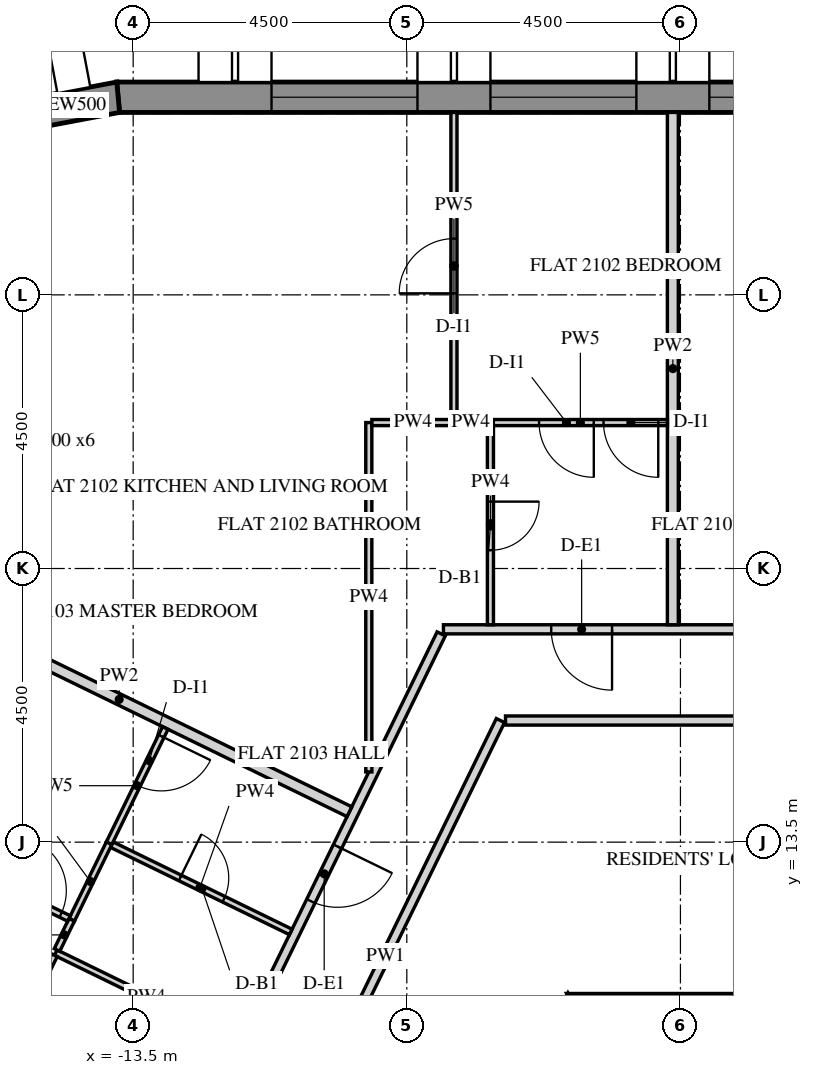
"""IFC4 building model, lengths in metres.
Left out: names, types, materials, properties, quantities, classifications, styles, units other than length and angle.
Written with IfcOpenShell. Run it as: python <this file> out.ifc"""

import sys

from ifc_helpers import new_model, si_unit, direction, frame, frame_2d, origin, place, context, subcontext, project, spatial, polyline, rectangle, outline, extrude, element, fill, save


model = new_model("IFC4")
c1 = context("Model", 3, precision=1e-05, world=origin(), true_north=direction((0.0, 1.0)))
c2 = subcontext(c1, "Body", "Model", "MODEL_VIEW")
j1 = project(units=[si_unit("LENGTHUNIT", "METRE"), si_unit("PLANEANGLEUNIT", "RADIAN")], contexts=[c1])
p1 = place(None, origin())
s1 = spatial("IfcSite", under=j1, at=p1, CompositionType="ELEMENT")
p2 = place(p1, origin())
s2 = spatial("IfcBuilding", under=s1, at=p2, CompositionType="ELEMENT")
p3 = place(p2, frame((0.0, 0.0, 267.9)))
s3 = spatial("IfcBuildingStorey", under=s2, at=p3, CompositionType="ELEMENT", Elevation=267.9)
p4 = place(p3, frame((11.698, 25.75, -0.15), z_axis=(0.0, 0.0, 1.0), x_axis=(-1.0, 0.0, 0.0)))
e1 = element("IfcWall", 1, at=p4, inside=s3, PredefinedType="SOLIDWALL", context=c2, shape_type="SweptSolid", body=[
    extrude(outline(polyline([(-0.021, -0.25), (25.468, -0.25), (25.421, 0.25), (0.021, 0.25), (-0.021, -0.25)])), origin(), (0.0, 0.0, 1.0), 3.9),
])
p5 = place(p4, frame((2.522, 0.0, 0.75)))
e2 = element("IfcOpeningElement", 2, at=p5, cuts=e1, PredefinedType="OPENING", context=c2, shape_type="SweptSolid", body=[
    extrude(rectangle(XDim=2.4, YDim=2.7, at=frame_2d((1.2, 1.35))), frame((0.0, 0.26, 0.0), z_axis=(0.0, -1.0, 0.0), x_axis=(1.0, 0.0, 0.0)), (0.0, 0.0, 1.0), 0.52),
])
p6 = place(p4, frame((6.122, 0.0, 0.75)))
e3 = element("IfcOpeningElement", 3, at=p6, cuts=e1, PredefinedType="OPENING", context=c2, shape_type="SweptSolid", body=[
    extrude(rectangle(XDim=2.4, YDim=2.7, at=frame_2d((1.2, 1.35))), frame((0.0, 0.26, 0.0), z_axis=(0.0, -1.0, 0.0), x_axis=(1.0, 0.0, 0.0)), (0.0, 0.0, 1.0), 0.52),
])
p7 = place(p4, frame((9.722, 0.0, 0.75)))
e4 = element("IfcOpeningElement", 4, at=p7, cuts=e1, PredefinedType="OPENING", context=c2, shape_type="SweptSolid", body=[
    extrude(rectangle(XDim=2.4, YDim=2.7, at=frame_2d((1.2, 1.35))), frame((0.0, 0.26, 0.0), z_axis=(0.0, -1.0, 0.0), x_axis=(1.0, 0.0, 0.0)), (0.0, 0.0, 1.0), 0.52),
])
p8 = place(p4, frame((13.323, 0.0, 0.75)))
e5 = element("IfcOpeningElement", 5, at=p8, cuts=e1, PredefinedType="OPENING", context=c2, shape_type="SweptSolid", body=[
    extrude(rectangle(XDim=2.4, YDim=2.7, at=frame_2d((1.2, 1.35))), frame((0.0, 0.26, 0.0), z_axis=(0.0, -1.0, 0.0), x_axis=(1.0, 0.0, 0.0)), (0.0, 0.0, 1.0), 0.52),
])
p9 = place(p4, frame((16.922, 0.0, 0.75)))
e6 = element("IfcOpeningElement", 6, at=p9, cuts=e1, PredefinedType="OPENING", context=c2, shape_type="SweptSolid", body=[
    extrude(rectangle(XDim=2.4, YDim=2.7, at=frame_2d((1.2, 1.35))), frame((0.0, 0.26, 0.0), z_axis=(0.0, -1.0, 0.0), x_axis=(1.0, 0.0, 0.0)), (0.0, 0.0, 1.0), 0.52),
])
p10 = place(p4, frame((20.522, 0.0, 0.75)))
e7 = element("IfcOpeningElement", 7, at=p10, cuts=e1, PredefinedType="OPENING", context=c2, shape_type="SweptSolid", body=[
    extrude(rectangle(XDim=2.4, YDim=2.7, at=frame_2d((1.2, 1.35))), frame((0.0, 0.26, 0.0), z_axis=(0.0, -1.0, 0.0), x_axis=(1.0, 0.0, 0.0)), (0.0, 0.0, 1.0), 0.52),
])
p11 = place(p3, frame((-13.747, 25.75, -0.15), z_axis=(0.0, 0.0, 1.0), x_axis=(-0.982736538448, -0.185010529429, 0.0)))
e8 = element("IfcWall", 8, at=p11, inside=s3, PredefinedType="SOLIDWALL", context=c2, shape_type="SweptSolid", body=[
    extrude(outline(polyline([(-0.023, -0.25), (1.435, -0.25), (1.341, 0.25), (0.023, 0.25), (-0.023, -0.25)])), origin(), (0.0, 0.0, 1.0), 3.9),
])
p12 = place(p3, frame((-6.235, 10.8, -0.15), z_axis=(0.0, 0.0, 1.0), x_axis=(-0.499996419489, -0.866027470984, 0.0)))
e9 = element("IfcWall", 9, at=p12, inside=s3, PredefinedType="SHEAR", context=c2, shape_type="SweptSolid", body=[
    extrude(outline(polyline([(-0.115, -0.2), (12.586, -0.2), (12.355, 0.2), (0.115, 0.2), (-0.115, -0.2)])), origin(), (0.0, 0.0, 1.0), 3.9),
])
p13 = place(p12, frame((5.364, 0.0, 0.15)))
e10 = element("IfcOpeningElement", 10, at=p13, cuts=e9, PredefinedType="OPENING", context=c2, shape_type="SweptSolid", body=[
    extrude(rectangle(XDim=1.8, YDim=2.4, at=frame_2d((0.9, 1.2))), frame((0.0, 0.21, 0.0), z_axis=(0.0, -1.0, 0.0), x_axis=(1.0, 0.0, 0.0)), (0.0, 0.0, 1.0), 0.42),
])
p14 = place(p3, frame((6.235, 10.8, -0.15), z_axis=(0.0, 0.0, 1.0), x_axis=(-1.0, 0.0, 0.0)))
e11 = element("IfcWall", 11, at=p14, inside=s3, PredefinedType="SHEAR", context=c2, shape_type="SweptSolid", body=[
    extrude(outline(polyline([(-0.115, -0.2), (12.586, -0.2), (12.355, 0.2), (0.115, 0.2), (-0.115, -0.2)])), origin(), (0.0, 0.0, 1.0), 3.9),
])
p15 = place(p3, frame((6.627, 17.0, 0.0), z_axis=(0.0, 0.0, 1.0), x_axis=(-1.0, 0.0, 0.0)))
e12 = element("IfcWall", 12, at=p15, inside=s3, PredefinedType="PARTITIONING", context=c2, shape_type="SweptSolid", body=[
    extrude(rectangle(XDim=15.024, YDim=0.15, at=frame_2d((7.512, 0.0))), origin(), (0.0, 0.0, 1.0), 2.988),
])
p16 = place(p15, frame((0.8, 0.0, 0.0)))
e13 = element("IfcOpeningElement", 13, at=p16, cuts=e12, PredefinedType="OPENING", context=c2, shape_type="SweptSolid", body=[
    extrude(rectangle(XDim=1.0, YDim=2.1, at=frame_2d((0.5, 1.05))), frame((0.0, 0.085, 0.0), z_axis=(0.0, -1.0, 0.0), x_axis=(1.0, 0.0, 0.0)), (0.0, 0.0, 1.0), 0.17),
])
p17 = place(p15, frame((12.251, 0.0, 0.0)))
e14 = element("IfcOpeningElement", 14, at=p17, cuts=e12, PredefinedType="OPENING", context=c2, shape_type="SweptSolid", body=[
    extrude(rectangle(XDim=1.0, YDim=2.1, at=frame_2d((0.5, 1.05))), frame((0.0, 0.085, 0.0), z_axis=(0.0, -1.0, 0.0), x_axis=(1.0, 0.0, 0.0)), (0.0, 0.0, 1.0), 0.17),
])
p18 = place(p3, frame((-8.434, 16.925, 0.0), z_axis=(0.0, 0.0, 1.0), x_axis=(-0.438371383278, -0.898793930956, 0.0)))
e15 = element("IfcWall", 15, at=p18, inside=s3, PredefinedType="PARTITIONING", context=c2, shape_type="SweptSolid", body=[
    extrude(rectangle(XDim=16.939, YDim=0.15, at=frame_2d((8.47, 0.0))), origin(), (0.0, 0.0, 1.0), 2.988),
])
p19 = place(p18, frame((3.89, 0.0, 0.0)))
e16 = element("IfcOpeningElement", 16, at=p19, cuts=e15, PredefinedType="OPENING", context=c2, shape_type="SweptSolid", body=[
    extrude(rectangle(XDim=1.0, YDim=2.1, at=frame_2d((0.5, 1.05))), frame((0.0, 0.085, 0.0), z_axis=(0.0, -1.0, 0.0), x_axis=(1.0, 0.0, 0.0)), (0.0, 0.0, 1.0), 0.17),
])
p20 = place(p3, frame((-11.238, 7.754, 0.0), z_axis=(0.0, 0.0, 1.0), x_axis=(0.438387352899, 0.89878614187, 0.0)))
e17 = element("IfcWall", 17, at=p20, inside=s3, PredefinedType="PARTITIONING", context=c2, shape_type="SweptSolid", body=[
    extrude(rectangle(XDim=8.618, YDim=0.15, at=frame_2d((4.309, 0.0))), origin(), (0.0, 0.0, 1.0), 2.988),
])
p21 = place(p3, frame((-7.377, 15.5, 0.0), z_axis=(0.0, 0.0, 1.0), x_axis=(1.0, 0.0, 0.0)))
e18 = element("IfcWall", 18, at=p21, inside=s3, PredefinedType="PARTITIONING", context=c2, shape_type="SweptSolid", body=[
    extrude(rectangle(XDim=13.206, YDim=0.15, at=frame_2d((6.603, 0.0))), origin(), (0.0, 0.0, 1.0), 2.988),
])
p22 = place(p21, frame((6.153, 0.0, 0.0)))
e19 = element("IfcOpeningElement", 19, at=p22, cuts=e18, PredefinedType="OPENING", context=c2, shape_type="SweptSolid", body=[
    extrude(rectangle(XDim=0.9, YDim=2.1, at=frame_2d((0.45, 1.05))), frame((0.0, 0.085, 0.0), z_axis=(0.0, -1.0, 0.0), x_axis=(1.0, 0.0, 0.0)), (0.0, 0.0, 1.0), 0.17),
])
p23 = place(p3, frame((-4.625, 25.5, 0.0), z_axis=(0.0, 0.0, 1.0), x_axis=(0.0, -1.0, 0.0)))
e20 = element("IfcWall", 20, at=p23, inside=s3, PredefinedType="PARTITIONING", context=c2, shape_type="SweptSolid", body=[
    extrude(rectangle(XDim=8.425, YDim=0.18, at=frame_2d((4.212, 0.0))), origin(), (0.0, 0.0, 1.0), 2.988),
])
p24 = place(p3, frame((-9.625, 14.655, 0.0), z_axis=(0.0, 0.0, 1.0), x_axis=(0.0, 1.0, 0.0)))
e21 = element("IfcWall", 21, at=p24, inside=s3, PredefinedType="PARTITIONING", context=c2, shape_type="SweptSolid", body=[
    extrude(rectangle(XDim=5.745, YDim=0.1, at=frame_2d((2.873, 0.0))), origin(), (0.0, 0.0, 1.0), 2.988),
])
p25 = place(p3, frame((-9.575, 20.4, 0.0), z_axis=(0.0, 0.0, 1.0), x_axis=(1.0, 0.0, 0.0)))
e22 = element("IfcWall", 22, at=p25, inside=s3, PredefinedType="PARTITIONING", context=c2, shape_type="SweptSolid", body=[
    extrude(rectangle(XDim=1.352, YDim=0.1, at=frame_2d((0.676, 0.0))), origin(), (0.0, 0.0, 1.0), 2.988),
])
p26 = place(p3, frame((-8.225, 20.45, 0.0), z_axis=(0.0, 0.0, 1.0), x_axis=(0.0, 1.0, 0.0)))
e23 = element("IfcWall", 23, at=p26, inside=s3, PredefinedType="PARTITIONING", context=c2, shape_type="SweptSolid", body=[
    extrude(rectangle(XDim=5.05, YDim=0.1, at=frame_2d((2.525, 0.0))), origin(), (0.0, 0.0, 1.0), 2.988),
])
p27 = place(p26, frame((2.075, 0.0, 0.0)))
e24 = element("IfcOpeningElement", 24, at=p27, cuts=e23, PredefinedType="OPENING", context=c2, shape_type="SweptSolid", body=[
    extrude(rectangle(XDim=0.9, YDim=2.1, at=frame_2d((0.45, 1.05))), frame((0.0, 0.06, 0.0), z_axis=(0.0, -1.0, 0.0), x_axis=(1.0, 0.0, 0.0)), (0.0, 0.0, 1.0), 0.12),
])
p28 = place(p3, frame((-17.516, 17.694, 0.0), z_axis=(0.0, 0.0, 1.0), x_axis=(0.898788496909, -0.438382524543, 0.0)))
e25 = element("IfcWall", 25, at=p28, inside=s3, PredefinedType="PARTITIONING", context=c2, shape_type="SweptSolid", body=[
    extrude(rectangle(XDim=8.425, YDim=0.18, at=frame_2d((4.212, 0.0))), origin(), (0.0, 0.0, 1.0), 2.988),
])
p29 = place(p3, frame((-7.625, 20.4, 0.0), z_axis=(0.0, 0.0, 1.0), x_axis=(0.0, -1.0, 0.0)))
e26 = element("IfcWall", 26, at=p29, inside=s3, PredefinedType="PARTITIONING", context=c2, shape_type="SweptSolid", body=[
    extrude(rectangle(XDim=3.325, YDim=0.1, at=frame_2d((1.663, 0.0))), origin(), (0.0, 0.0, 1.0), 2.988),
])
p30 = place(p29, frame((1.3, 0.0, 0.0)))
e27 = element("IfcOpeningElement", 27, at=p30, cuts=e26, PredefinedType="OPENING", context=c2, shape_type="SweptSolid", body=[
    extrude(rectangle(XDim=0.8, YDim=2.1, at=frame_2d((0.4, 1.05))), frame((0.0, 0.06, 0.0), z_axis=(0.0, -1.0, 0.0), x_axis=(1.0, 0.0, 0.0)), (0.0, 0.0, 1.0), 0.12),
])
p31 = place(p3, frame((-4.715, 20.4, 0.0), z_axis=(0.0, 0.0, 1.0), x_axis=(-1.0, 0.0, 0.0)))
e28 = element("IfcWall", 28, at=p31, inside=s3, PredefinedType="PARTITIONING", context=c2, shape_type="SweptSolid", body=[
    extrude(rectangle(XDim=2.862, YDim=0.1, at=frame_2d((1.431, 0.0))), origin(), (0.0, 0.0, 1.0), 2.988),
])
p32 = place(p31, frame((0.15, 0.0, 0.0)))
e29 = element("IfcOpeningElement", 29, at=p32, cuts=e28, PredefinedType="OPENING", context=c2, shape_type="SweptSolid", body=[
    extrude(rectangle(XDim=0.9, YDim=2.1, at=frame_2d((0.45, 1.05))), frame((0.0, 0.06, 0.0), z_axis=(0.0, -1.0, 0.0), x_axis=(1.0, 0.0, 0.0)), (0.0, 0.0, 1.0), 0.12),
])
p33 = place(p31, frame((1.21, 0.0, 0.0)))
e30 = element("IfcOpeningElement", 30, at=p33, cuts=e28, PredefinedType="OPENING", context=c2, shape_type="SweptSolid", body=[
    extrude(rectangle(XDim=0.9, YDim=2.1, at=frame_2d((0.45, 1.05))), frame((0.0, 0.06, 0.0), z_axis=(0.0, -1.0, 0.0), x_axis=(1.0, 0.0, 0.0)), (0.0, 0.0, 1.0), 0.12),
])
p34 = place(p3, frame((-7.673, 20.4, 0.0), z_axis=(0.0, 0.0, 1.0), x_axis=(-1.0, 0.0, 0.0)))
e31 = element("IfcWall", 31, at=p34, inside=s3, PredefinedType="PARTITIONING", context=c2, shape_type="SweptSolid", body=[
    extrude(rectangle(XDim=0.552, YDim=0.1, at=frame_2d((0.276, 0.0))), origin(), (0.0, 0.0, 1.0), 2.988),
])
p35 = place(p3, frame((-11.785, 10.226, 0.0), z_axis=(0.0, 0.0, 1.0), x_axis=(-0.898803726577, 0.438351298723, 0.0)))
e32 = element("IfcWall", 32, at=p35, inside=s3, PredefinedType="PARTITIONING", context=c2, shape_type="SweptSolid", body=[
    extrude(rectangle(XDim=3.325, YDim=0.1, at=frame_2d((1.663, 0.0))), origin(), (0.0, 0.0, 1.0), 2.988),
])
p36 = place(p3, frame((-14.794, 11.64, 0.0), z_axis=(0.0, 0.0, 1.0), x_axis=(-0.438392673906, -0.898783546503, 0.0)))
e33 = element("IfcWall", 33, at=p36, inside=s3, PredefinedType="PARTITIONING", context=c2, shape_type="SweptSolid", body=[
    extrude(rectangle(XDim=2.952, YDim=0.1, at=frame_2d((1.476, 0.0))), origin(), (0.0, 0.0, 1.0), 2.988),
])
p37 = place(p36, frame((0.702, 0.0, 0.0)))
e34 = element("IfcOpeningElement", 34, at=p37, cuts=e33, PredefinedType="OPENING", context=c2, shape_type="SweptSolid", body=[
    extrude(rectangle(XDim=0.9, YDim=2.1, at=frame_2d((0.45, 1.05))), frame((0.0, 0.06, 0.0), z_axis=(0.0, -1.0, 0.0), x_axis=(1.0, 0.0, 0.0)), (0.0, 0.0, 1.0), 0.12),
])
p38 = place(p3, frame((-13.897, 13.481, 0.0), z_axis=(0.0, 0.0, 1.0), x_axis=(0.898803726577, -0.438351298723, 0.0)))
e35 = element("IfcWall", 35, at=p38, inside=s3, PredefinedType="PARTITIONING", context=c2, shape_type="SweptSolid", body=[
    extrude(rectangle(XDim=3.325, YDim=0.1, at=frame_2d((1.663, 0.0))), origin(), (0.0, 0.0, 1.0), 2.988),
])
p39 = place(p38, frame((1.3, 0.0, 0.0)))
e36 = element("IfcOpeningElement", 36, at=p39, cuts=e35, PredefinedType="OPENING", context=c2, shape_type="SweptSolid", body=[
    extrude(rectangle(XDim=0.8, YDim=2.1, at=frame_2d((0.4, 1.05))), frame((0.0, 0.06, 0.0), z_axis=(0.0, -1.0, 0.0), x_axis=(1.0, 0.0, 0.0)), (0.0, 0.0, 1.0), 0.12),
])
p40 = place(p3, frame((-12.972, 15.377, 0.0), z_axis=(0.0, 0.0, 1.0), x_axis=(-0.438453238863, -0.898754002678, 0.0)))
e37 = element("IfcWall", 37, at=p40, inside=s3, PredefinedType="PARTITIONING", context=c2, shape_type="SweptSolid", body=[
    extrude(rectangle(XDim=2.112, YDim=0.1, at=frame_2d((1.056, 0.0))), origin(), (0.0, 0.0, 1.0), 2.988),
])
p41 = place(p40, frame((0.15, 0.0, 0.0)))
e38 = element("IfcOpeningElement", 38, at=p41, cuts=e37, PredefinedType="OPENING", context=c2, shape_type="SweptSolid", body=[
    extrude(rectangle(XDim=0.9, YDim=2.1, at=frame_2d((0.45, 1.05))), frame((0.0, 0.06, 0.0), z_axis=(0.0, -1.0, 0.0), x_axis=(1.0, 0.0, 0.0)), (0.0, 0.0, 1.0), 0.12),
])
p42 = place(p3, frame((-13.896, 13.483, 0.0), z_axis=(0.0, 0.0, 1.0), x_axis=(-0.438416771233, -0.898771792337, 0.0)))
e39 = element("IfcWall", 39, at=p42, inside=s3, PredefinedType="PARTITIONING", context=c2, shape_type="SweptSolid", body=[
    extrude(rectangle(XDim=1.402, YDim=0.1, at=frame_2d((0.701, 0.0))), origin(), (0.0, 0.0, 1.0), 2.988),
])
p43 = place(p3, frame((-14.51, 12.223, 0.0), z_axis=(0.0, 0.0, 1.0), x_axis=(-0.438345197703, -0.898806702051, 0.0)))
e40 = element("IfcWall", 40, at=p43, inside=s3, PredefinedType="PARTITIONING", context=c2, shape_type="SweptSolid", body=[
    extrude(rectangle(XDim=0.552, YDim=0.1, at=frame_2d((0.276, 0.0))), origin(), (0.0, 0.0, 1.0), 2.988),
])
p44 = place(p3, frame((-19.094, 14.458, 0.0), z_axis=(0.0, 0.0, 1.0), x_axis=(0.898783313387, -0.438393151837, 0.0)))
e41 = element("IfcWall", 41, at=p44, inside=s3, PredefinedType="PARTITIONING", context=c2, shape_type="SweptSolid", body=[
    extrude(rectangle(XDim=5.05, YDim=0.1, at=frame_2d((2.525, 0.0))), origin(), (0.0, 0.0, 1.0), 2.988),
])
p45 = place(p44, frame((4.0, 0.0, 0.0)))
e42 = element("IfcOpeningElement", 42, at=p45, cuts=e41, PredefinedType="OPENING", context=c2, shape_type="SweptSolid", body=[
    extrude(rectangle(XDim=0.9, YDim=2.1, at=frame_2d((0.45, 1.05))), frame((0.0, 0.06, 0.0), z_axis=(0.0, -1.0, 0.0), x_axis=(1.0, 0.0, 0.0)), (0.0, 0.0, 1.0), 0.12),
])
p46 = place(p8, frame((0.0, 0.18, 0.0)))
e43 = element("IfcWindow", 43, at=p46, inside=s3, PartitioningType="DOUBLE_PANEL_VERTICAL", PredefinedType="WINDOW", context=c2, shape_type="SweptSolid", body=[
    extrude(rectangle(XDim=2.4, YDim=2.7, at=frame_2d((1.2, 1.35))), frame((0.0, 0.03, 0.0), z_axis=(0.0, -1.0, 0.0), x_axis=(1.0, 0.0, 0.0)), (0.0, 0.0, 1.0), 0.06),
])
fill(e5, e43)
p47 = place(p9, frame((0.0, 0.18, 0.0)))
e44 = element("IfcWindow", 44, at=p47, inside=s3, PartitioningType="DOUBLE_PANEL_VERTICAL", PredefinedType="WINDOW", context=c2, shape_type="SweptSolid", body=[
    extrude(rectangle(XDim=2.4, YDim=2.7, at=frame_2d((1.2, 1.35))), frame((0.0, 0.03, 0.0), z_axis=(0.0, -1.0, 0.0), x_axis=(1.0, 0.0, 0.0)), (0.0, 0.0, 1.0), 0.06),
])
fill(e6, e44)
p48 = place(p10, frame((0.0, 0.18, 0.0)))
e45 = element("IfcWindow", 45, at=p48, inside=s3, PartitioningType="DOUBLE_PANEL_VERTICAL", PredefinedType="WINDOW", context=c2, shape_type="SweptSolid", body=[
    extrude(rectangle(XDim=2.4, YDim=2.7, at=frame_2d((1.2, 1.35))), frame((0.0, 0.03, 0.0), z_axis=(0.0, -1.0, 0.0), x_axis=(1.0, 0.0, 0.0)), (0.0, 0.0, 1.0), 0.06),
])
fill(e7, e45)
p49 = place(p17, origin())
e46 = element("IfcDoor", 46, at=p49, inside=s3, OperationType="SINGLE_SWING_LEFT", PredefinedType="DOOR", context=c2, shape_type="SweptSolid", body=[
    extrude(rectangle(XDim=1.0, YDim=2.1, at=frame_2d((0.5, 1.05))), frame((0.0, 0.025, 0.0), z_axis=(0.0, -1.0, 0.0), x_axis=(1.0, 0.0, 0.0)), (0.0, 0.0, 1.0), 0.05),
])
fill(e14, e46)
p50 = place(p30, origin())
e47 = element("IfcDoor", 47, at=p50, inside=s3, OperationType="SINGLE_SWING_LEFT", PredefinedType="DOOR", context=c2, shape_type="SweptSolid", body=[
    extrude(rectangle(XDim=0.8, YDim=2.1, at=frame_2d((0.4, 1.05))), frame((0.0, 0.025, 0.0), z_axis=(0.0, -1.0, 0.0), x_axis=(1.0, 0.0, 0.0)), (0.0, 0.0, 1.0), 0.05),
])
fill(e27, e47)
p51 = place(p32, origin())
e48 = element("IfcDoor", 48, at=p51, inside=s3, OperationType="SINGLE_SWING_LEFT", PredefinedType="DOOR", context=c2, shape_type="SweptSolid", body=[
    extrude(rectangle(XDim=0.9, YDim=2.1, at=frame_2d((0.45, 1.05))), frame((0.0, 0.025, 0.0), z_axis=(0.0, -1.0, 0.0), x_axis=(1.0, 0.0, 0.0)), (0.0, 0.0, 1.0), 0.05),
])
fill(e29, e48)
p52 = place(p33, origin())
e49 = element("IfcDoor", 49, at=p52, inside=s3, OperationType="SINGLE_SWING_LEFT", PredefinedType="DOOR", context=c2, shape_type="SweptSolid", body=[
    extrude(rectangle(XDim=0.9, YDim=2.1, at=frame_2d((0.45, 1.05))), frame((0.0, 0.025, 0.0), z_axis=(0.0, -1.0, 0.0), x_axis=(1.0, 0.0, 0.0)), (0.0, 0.0, 1.0), 0.05),
])
fill(e30, e49)
p53 = place(p19, origin())
e50 = element("IfcDoor", 50, at=p53, inside=s3, OperationType="SINGLE_SWING_RIGHT", PredefinedType="DOOR", context=c2, shape_type="SweptSolid", body=[
    extrude(rectangle(XDim=1.0, YDim=2.1, at=frame_2d((0.5, 1.05))), frame((0.0, 0.025, 0.0), z_axis=(0.0, -1.0, 0.0), x_axis=(1.0, 0.0, 0.0)), (0.0, 0.0, 1.0), 0.05),
])
fill(e16, e50)
p54 = place(p39, origin())
e51 = element("IfcDoor", 51, at=p54, inside=s3, OperationType="SINGLE_SWING_LEFT", PredefinedType="DOOR", context=c2, shape_type="SweptSolid", body=[
    extrude(rectangle(XDim=0.8, YDim=2.1, at=frame_2d((0.4, 1.05))), frame((0.0, 0.025, 0.0), z_axis=(0.0, -1.0, 0.0), x_axis=(1.0, 0.0, 0.0)), (0.0, 0.0, 1.0), 0.05),
])
fill(e36, e51)
p55 = place(p41, origin())
e52 = element("IfcDoor", 52, at=p55, inside=s3, OperationType="SINGLE_SWING_LEFT", PredefinedType="DOOR", context=c2, shape_type="SweptSolid", body=[
    extrude(rectangle(XDim=0.9, YDim=2.1, at=frame_2d((0.45, 1.05))), frame((0.0, 0.025, 0.0), z_axis=(0.0, -1.0, 0.0), x_axis=(1.0, 0.0, 0.0)), (0.0, 0.0, 1.0), 0.05),
])
fill(e38, e52)
p56 = place(p45, origin())
e53 = element("IfcDoor", 53, at=p56, inside=s3, OperationType="SINGLE_SWING_RIGHT", PredefinedType="DOOR", context=c2, shape_type="SweptSolid", body=[
    extrude(rectangle(XDim=0.9, YDim=2.1, at=frame_2d((0.45, 1.05))), frame((0.0, 0.025, 0.0), z_axis=(0.0, -1.0, 0.0), x_axis=(1.0, 0.0, 0.0)), (0.0, 0.0, 1.0), 0.05),
])
fill(e42, e53)
p57 = place(p27, origin())
e54 = element("IfcDoor", 54, at=p57, inside=s3, OperationType="SINGLE_SWING_RIGHT", PredefinedType="DOOR", context=c2, shape_type="SweptSolid", body=[
    extrude(rectangle(XDim=0.9, YDim=2.1, at=frame_2d((0.45, 1.05))), frame((0.0, 0.025, 0.0), z_axis=(0.0, -1.0, 0.0), x_axis=(1.0, 0.0, 0.0)), (0.0, 0.0, 1.0), 0.05),
])
fill(e24, e54)
save(model, sys.argv[1])
